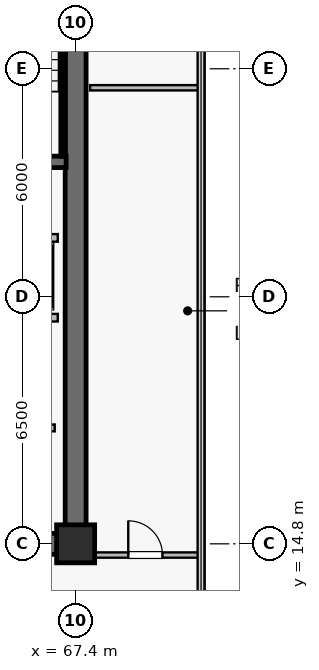
"""IFC4 building model, lengths in metres.
Left out: names, types, materials, properties, quantities, classifications, styles, units other than length and angle.
Written with IfcOpenShell. Run it as: python <this file> out.ifc"""

import sys

from ifc_helpers import new_model, si_unit, direction, frame, frame_2d, origin, origin_2d, place, context, subcontext, project, spatial, rectangle, extrude, source, transform, mapped, element, fill, save


model = new_model("IFC4")
c1 = context("Model", 3, precision=1e-05, world=origin(), true_north=direction((0.0, 1.0)))
c2 = subcontext(c1, "Body", "Model", "MODEL_VIEW")
j1 = project(units=[si_unit("LENGTHUNIT", "METRE"), si_unit("PLANEANGLEUNIT", "RADIAN")], contexts=[c1])
p1 = place(None, origin())
s1 = spatial("IfcSite", under=j1, at=p1, CompositionType="ELEMENT")
p2 = place(p1, origin())
s2 = spatial("IfcBuilding", under=s1, at=p2, CompositionType="ELEMENT")
p3 = place(p2, frame((0.0, 0.0, 258.8)))
s3 = spatial("IfcBuildingStorey", under=s2, at=p3, CompositionType="ELEMENT", Elevation=258.8)
p4 = place(p3, frame((52.325, 14.8, 0.0), z_axis=(0.0, 0.0, 1.0), x_axis=(1.0, 0.0, 0.0)))
e1 = element("IfcWall", 1, at=p4, inside=s3, PredefinedType="SHEAR", context=c2, shape_type="SweptSolid", body=[
    extrude(rectangle(XDim=15.35, YDim=0.55, at=frame_2d((7.675, 0.0))), origin(), (0.0, 0.0, 1.0), 3.8),
])
p5 = place(p3, frame((67.4, 15.075, 0.0), z_axis=(0.0, 0.0, 1.0), x_axis=(0.0, 1.0, 0.0)))
e2 = element("IfcWall", 2, at=p5, inside=s3, PredefinedType="SHEAR", context=c2, shape_type="SweptSolid", body=[
    extrude(rectangle(XDim=18.45, YDim=0.55, at=frame_2d((9.225, 0.0))), origin(), (0.0, 0.0, 1.0), 3.8),
])
p6 = place(p3, frame((63.35, 24.85, 0.0), z_axis=(0.0, 0.0, 1.0), x_axis=(1.0, 0.0, 0.0)))
e3 = element("IfcWall", 3, at=p6, inside=s3, PredefinedType="SHEAR", context=c2, shape_type="SweptSolid", body=[
    extrude(rectangle(XDim=3.8, YDim=0.3, at=frame_2d((1.9, 0.0))), origin(), (0.0, 0.0, 1.0), 3.8),
])
p7 = place(p3, frame((67.07, 25.0, 0.0), z_axis=(0.0, 0.0, 1.0), x_axis=(0.0, 1.0, 0.0)))
e4 = element("IfcWall", 4, at=p7, inside=s3, PredefinedType="SOLIDWALL", context=c2, shape_type="SweptSolid", body=[
    extrude(rectangle(XDim=8.32, YDim=0.12, at=frame_2d((4.16, 0.0))), origin(), (0.0, 0.0, 1.0), 3.8),
])
m1 = source(origin(), c2, "Body", "SweptSolid", [
    extrude(rectangle(XDim=1.0, YDim=1.0, at=origin_2d()), origin(), (0.0, 0.0, 1.0), 4.1),
])
p8 = place(p3, frame((67.4, 14.8, 0.0), z_axis=(0.0, 0.0, 1.0), x_axis=(1.0, 0.0, 0.0)))
e5 = element("IfcColumn", 5, at=p8, inside=s3, PredefinedType="COLUMN", context=c2, shape_type="MappedRepresentation", body=[
    mapped(m1, transform((0.0, 0.0, 0.0), scale=1.0)),
])
p9 = place(p3, frame((64.67, 20.75, 0.0), z_axis=(0.0, 0.0, 1.0), x_axis=(1.0, 0.0, 0.0)))
e6 = element("IfcWall", 6, at=p9, inside=s3, PredefinedType="SOLIDWALL", context=c2, shape_type="SweptSolid", body=[
    extrude(rectangle(XDim=2.26, YDim=0.2, at=frame_2d((1.13, 0.0))), origin(), (0.0, 0.0, 1.0), 3.8),
])
p10 = place(p9, frame((0.58, 0.0, 0.0)))
e7 = element("IfcOpeningElement", 7, at=p10, cuts=e6, PredefinedType="OPENING", context=c2, shape_type="SweptSolid", body=[
    extrude(rectangle(XDim=1.1, YDim=2.22, at=frame_2d((0.55, 1.11))), frame((0.0, 0.11, 0.0), z_axis=(0.0, -1.0, 0.0), x_axis=(1.0, 0.0, 0.0)), (0.0, 0.0, 1.0), 0.22),
])
p11 = place(p3, frame((64.67, 22.85, 0.0), z_axis=(0.0, 0.0, 1.0), x_axis=(1.0, 0.0, 0.0)))
e8 = element("IfcWall", 8, at=p11, inside=s3, PredefinedType="SOLIDWALL", context=c2, shape_type="SweptSolid", body=[
    extrude(rectangle(XDim=2.26, YDim=0.2, at=frame_2d((1.13, 0.0))), origin(), (0.0, 0.0, 1.0), 3.8),
])
p12 = place(p3, frame((63.6, 17.85, 0.0), z_axis=(0.0, 0.0, 1.0), x_axis=(1.0, 0.0, 0.0)))
e9 = element("IfcWall", 9, at=p12, inside=s3, PredefinedType="SOLIDWALL", context=c2, shape_type="SweptSolid", body=[
    extrude(rectangle(XDim=3.25, YDim=0.18, at=frame_2d((1.625, 0.0))), origin(), (0.0, 0.0, 1.0), 3.8),
])
p13 = place(p12, frame((1.15, 0.0, 0.0)))
e10 = element("IfcOpeningElement", 10, at=p13, cuts=e9, PredefinedType="OPENING", context=c2, shape_type="SweptSolid", body=[
    extrude(rectangle(XDim=0.95, YDim=2.15, at=frame_2d((0.475, 1.075))), frame((0.0, 0.1, 0.0), z_axis=(0.0, -1.0, 0.0), x_axis=(1.0, 0.0, 0.0)), (0.0, 0.0, 1.0), 0.2),
])
p14 = place(p3, frame((67.78, 26.8, 0.0), z_axis=(0.0, 0.0, 1.0), x_axis=(1.0, 0.0, 0.0)))
e11 = element("IfcWall", 11, at=p14, inside=s3, PredefinedType="PARTITIONING", context=c2, shape_type="SweptSolid", body=[
    extrude(rectangle(XDim=2.91, YDim=0.14, at=frame_2d((1.455, 0.0))), origin(), (0.0, 0.0, 1.0), 3.8),
])
p15 = place(p3, frame((67.78, 14.505, 0.0), z_axis=(0.0, 0.0, 1.0), x_axis=(1.0, 0.0, 0.0)))
e12 = element("IfcWall", 12, at=p15, inside=s3, PredefinedType="PARTITIONING", context=c2, shape_type="SweptSolid", body=[
    extrude(rectangle(XDim=2.91, YDim=0.14, at=frame_2d((1.455, 0.0))), origin(), (0.0, 0.0, 1.0), 3.8),
])
p16 = place(p15, frame((1.005, 0.0, 0.0)))
e13 = element("IfcOpeningElement", 13, at=p16, cuts=e12, PredefinedType="OPENING", context=c2, shape_type="SweptSolid", body=[
    extrude(rectangle(XDim=0.9, YDim=2.1, at=frame_2d((0.45, 1.05))), frame((0.0, 0.08, 0.0), z_axis=(0.0, -1.0, 0.0), x_axis=(1.0, 0.0, 0.0)), (0.0, 0.0, 1.0), 0.16),
])
m2 = source(origin(), c2, "Body", "SweptSolid", [
    extrude(rectangle(XDim=0.9, YDim=2.1, at=frame_2d((0.45, 1.05))), frame((0.0, 0.025, 0.0), z_axis=(0.0, -1.0, 0.0), x_axis=(1.0, 0.0, 0.0)), (0.0, 0.0, 1.0), 0.05),
])
p17 = place(p16, origin())
e14 = element("IfcDoor", 14, at=p17, inside=s3, OperationType="SINGLE_SWING_LEFT", PredefinedType="DOOR", context=c2, shape_type="MappedRepresentation", body=[
    mapped(m2, transform((0.0, 0.0, 0.0), scale=1.0)),
])
fill(e13, e14)
save(model, sys.argv[1])
